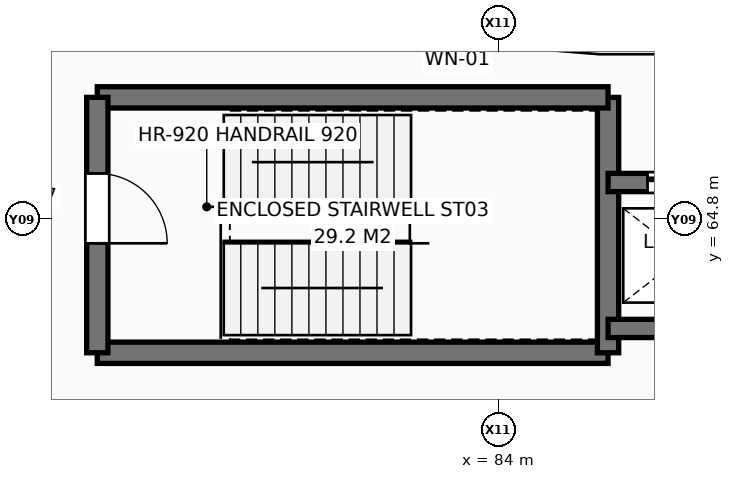
"""IFC4 building model, lengths in metres.
Left out: names, types, materials, properties, quantities, classifications, styles, units other than length and angle.
Written with IfcOpenShell. Run it as: python <this file> out.ifc"""

import sys

from ifc_helpers import new_model, si_unit, direction, frame, frame_2d, origin, place, context, subcontext, project, spatial, rectangle, extrude, element, fill, save


model = new_model("IFC4")
c1 = context("Model", 3, precision=1e-05, world=origin(), true_north=direction((0.0, 1.0)))
c2 = subcontext(c1, "Body", "Model", "MODEL_VIEW")
j1 = project(units=[si_unit("LENGTHUNIT", "METRE"), si_unit("PLANEANGLEUNIT", "RADIAN")], contexts=[c1])
p1 = place(None, origin())
s1 = spatial("IfcSite", under=j1, at=p1, CompositionType="ELEMENT")
p2 = place(p1, origin())
s2 = spatial("IfcBuilding", under=s1, at=p2, CompositionType="ELEMENT")
p3 = place(p2, frame((0.0, 0.0, 18.0)))
s3 = spatial("IfcBuildingStorey", under=s2, at=p3, CompositionType="ELEMENT", Elevation=18.0)
p4 = place(p3, frame((79.2, 68.103, 0.0), z_axis=(0.0, 0.0, 1.0), x_axis=(0.999197725269, -0.040048792968, 0.0)))
e1 = element("IfcWall", 1, at=p4, inside=s3, PredefinedType="SOLIDWALL", context=c2, shape_type="SweptSolid", body=[
    extrude(rectangle(XDim=13.04, YDim=0.34, at=frame_2d((6.52, 0.0))), origin(), (0.0, 0.0, 1.0), 3.387),
])
p5 = place(p4, frame((3.546, 0.0, 0.9)))
e2 = element("IfcOpeningElement", 2, at=p5, cuts=e1, PredefinedType="OPENING", context=c2, shape_type="SweptSolid", body=[
    extrude(rectangle(XDim=1.2, YDim=2.1, at=frame_2d((0.6, 1.05))), frame((0.0, 0.18, 0.0), z_axis=(0.0, -1.0, 0.0), x_axis=(1.0, 0.0, 0.0)), (0.0, 0.0, 1.0), 0.36),
])
p6 = place(p4, frame((8.293, 0.0, 0.9)))
e3 = element("IfcOpeningElement", 3, at=p6, cuts=e1, PredefinedType="OPENING", context=c2, shape_type="SweptSolid", body=[
    extrude(rectangle(XDim=1.2, YDim=2.1, at=frame_2d((0.6, 1.05))), frame((0.0, 0.18, 0.0), z_axis=(0.0, -1.0, 0.0), x_axis=(1.0, 0.0, 0.0)), (0.0, 0.0, 1.0), 0.36),
])
p7 = place(p3, frame((77.4, 62.6, 0.0), z_axis=(0.0, 0.0, 1.0), x_axis=(1.0, 0.0, 0.0)))
e4 = element("IfcWall", 4, at=p7, inside=s3, PredefinedType="SHEAR", context=c2, shape_type="SweptSolid", body=[
    extrude(rectangle(XDim=8.4, YDim=0.35, at=frame_2d((4.2, 0.0))), origin(), (0.0, 0.0, 1.0), 3.92),
])
p8 = place(p3, frame((85.8, 62.6, 0.0), z_axis=(0.0, 0.0, 1.0), x_axis=(0.0, 1.0, 0.0)))
e5 = element("IfcWall", 5, at=p8, inside=s3, PredefinedType="SHEAR", context=c2, shape_type="SweptSolid", body=[
    extrude(rectangle(XDim=4.2, YDim=0.35, at=frame_2d((2.1, 0.0))), origin(), (0.0, 0.0, 1.0), 3.92),
])
p9 = place(p3, frame((85.8, 66.8, 0.0), z_axis=(0.0, 0.0, 1.0), x_axis=(-1.0, 0.0, 0.0)))
e6 = element("IfcWall", 6, at=p9, inside=s3, PredefinedType="SHEAR", context=c2, shape_type="SweptSolid", body=[
    extrude(rectangle(XDim=8.4, YDim=0.35, at=frame_2d((4.2, 0.0))), origin(), (0.0, 0.0, 1.0), 3.92),
])
p10 = place(p3, frame((77.4, 66.8, 0.0), z_axis=(0.0, 0.0, 1.0), x_axis=(0.0, -1.0, 0.0)))
e7 = element("IfcWall", 7, at=p10, inside=s3, PredefinedType="SHEAR", context=c2, shape_type="SweptSolid", body=[
    extrude(rectangle(XDim=4.2, YDim=0.35, at=frame_2d((2.1, 0.0))), origin(), (0.0, 0.0, 1.0), 3.92),
])
p11 = place(p10, frame((1.25, 0.0, 0.0)))
e8 = element("IfcOpeningElement", 8, at=p11, cuts=e7, PredefinedType="OPENING", context=c2, shape_type="SweptSolid", body=[
    extrude(rectangle(XDim=1.15, YDim=2.2, at=frame_2d((0.575, 1.1))), frame((0.0, 0.185, 0.0), z_axis=(0.0, -1.0, 0.0), x_axis=(1.0, 0.0, 0.0)), (0.0, 0.0, 1.0), 0.37),
])
p12 = place(p3, frame((88.3, 65.4, 0.0), z_axis=(0.0, 0.0, 1.0), x_axis=(-1.0, 0.0, 0.0)))
e9 = element("IfcWall", 9, at=p12, inside=s3, PredefinedType="SHEAR", context=c2, shape_type="SweptSolid", body=[
    extrude(rectangle(XDim=2.5, YDim=0.3, at=frame_2d((1.25, 0.0))), origin(), (0.0, 0.0, 1.0), 3.92),
])
p13 = place(p12, frame((0.65, 0.0, 0.0)))
e10 = element("IfcOpeningElement", 10, at=p13, cuts=e9, PredefinedType="OPENING", context=c2, shape_type="SweptSolid", body=[
    extrude(rectangle(XDim=1.2, YDim=2.25, at=frame_2d((0.6, 1.125))), frame((0.0, 0.16, 0.0), z_axis=(0.0, -1.0, 0.0), x_axis=(1.0, 0.0, 0.0)), (0.0, 0.0, 1.0), 0.32),
])
p14 = place(p3, frame((85.8, 63.0, 0.0), z_axis=(0.0, 0.0, 1.0), x_axis=(1.0, 0.0, 0.0)))
e11 = element("IfcWall", 11, at=p14, inside=s3, PredefinedType="SHEAR", context=c2, shape_type="SweptSolid", body=[
    extrude(rectangle(XDim=2.5, YDim=0.3, at=frame_2d((1.25, 0.0))), origin(), (0.0, 0.0, 1.0), 3.92),
])
p15 = place(p11, origin())
e12 = element("IfcDoor", 12, at=p15, inside=s3, OperationType="SINGLE_SWING_RIGHT", PredefinedType="DOOR", context=c2, shape_type="SweptSolid", body=[
    extrude(rectangle(XDim=1.15, YDim=2.2, at=frame_2d((0.575, 1.1))), frame((0.0, 0.025, 0.0), z_axis=(0.0, -1.0, 0.0), x_axis=(1.0, 0.0, 0.0)), (0.0, 0.0, 1.0), 0.05),
])
fill(e8, e12)
p16 = place(p13, origin())
e13 = element("IfcDoor", 13, at=p16, inside=s3, OperationType="SLIDING_TO_LEFT", PredefinedType="DOOR", context=c2, shape_type="SweptSolid", body=[
    extrude(rectangle(XDim=1.2, YDim=2.25, at=frame_2d((0.6, 1.125))), frame((0.0, 0.025, 0.0), z_axis=(0.0, -1.0, 0.0), x_axis=(1.0, 0.0, 0.0)), (0.0, 0.0, 1.0), 0.05),
])
fill(e10, e13)
save(model, sys.argv[1])
